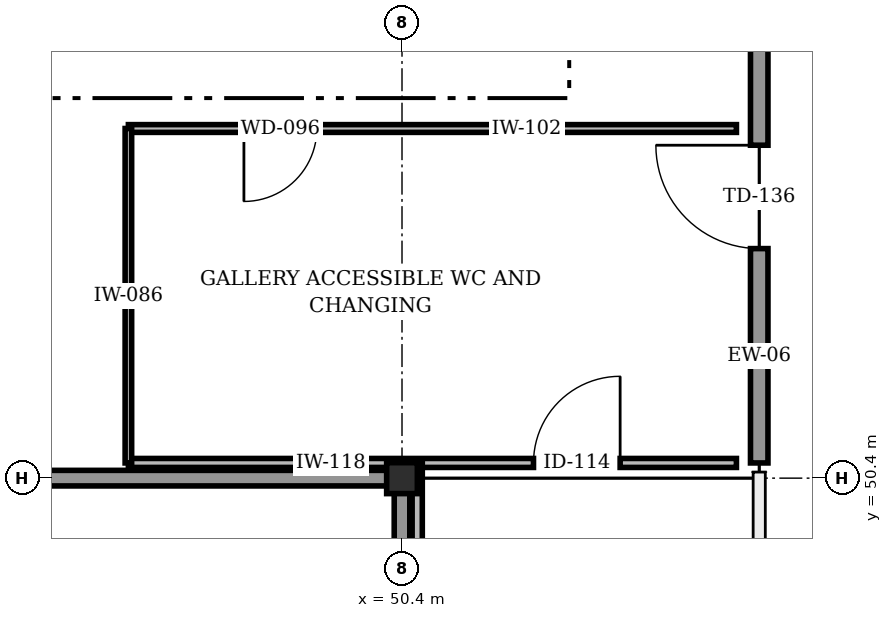
"""IFC4 building model, lengths in metres.
Left out: names, types, materials, properties, quantities, classifications, styles, units other than length and angle.
Written with IfcOpenShell. Run it as: python <this file> out.ifc"""

import sys

from ifc_helpers import new_model, si_unit, direction, frame, frame_2d, origin, origin_2d, place, context, subcontext, project, spatial, rectangle, i_section, extrude, element, fill, save


model = new_model("IFC4")
c1 = context("Model", 3, precision=1e-05, world=origin(), true_north=direction((0.0, 1.0)))
c2 = subcontext(c1, "Body", "Model", "MODEL_VIEW")
j1 = project(units=[si_unit("LENGTHUNIT", "METRE"), si_unit("PLANEANGLEUNIT", "RADIAN")], contexts=[c1])
p1 = place(None, origin())
s1 = spatial("IfcSite", under=j1, at=p1, CompositionType="ELEMENT")
p2 = place(p1, origin())
s2 = spatial("IfcBuilding", under=s1, at=p2, CompositionType="ELEMENT")
p3 = place(p2, frame((0.0, 0.0, 6.0)))
s3 = spatial("IfcBuildingStorey", under=s2, at=p3, CompositionType="ELEMENT", Elevation=6.0)
p4 = place(p3, frame((50.4, 50.4, 0.0), z_axis=(0.0, 0.0, 1.0), x_axis=(1.0, 0.0, 0.0)))
e1 = element("IfcColumn", 1, at=p4, inside=s3, PredefinedType="COLUMN", context=c2, shape_type="SweptSolid", body=[
    extrude(i_section(OverallWidth=0.404, OverallDepth=0.407, WebThickness=0.027, FlangeThickness=0.044, at=origin_2d()), origin(), (0.0, 0.0, 1.0), 4.2),
])
p5 = place(p3, frame((55.1, 50.6, 0.0), z_axis=(0.0, 0.0, 1.0), x_axis=(0.0, 1.0, 0.0)))
e2 = element("IfcWall", 2, at=p5, inside=s3, PredefinedType="STANDARD", context=c2, shape_type="SweptSolid", body=[
    extrude(rectangle(XDim=7.0, YDim=0.23, at=frame_2d((3.5, 0.0))), origin(), (0.0, 0.0, 1.0), 3.247),
])
p6 = place(p5, frame((2.82, 0.0, 0.0)))
e3 = element("IfcOpeningElement", 3, at=p6, cuts=e2, PredefinedType="OPENING", context=c2, shape_type="SweptSolid", body=[
    extrude(rectangle(XDim=1.36, YDim=2.22, at=frame_2d((0.68, 1.11))), frame((0.0, 0.125, 0.0), z_axis=(0.0, -1.0, 0.0), x_axis=(1.0, 0.0, 0.0)), (0.0, 0.0, 1.0), 0.25),
])
p7 = place(p3, frame((31.3, 50.4, 0.0), z_axis=(0.0, 0.0, 1.0), x_axis=(1.0, 0.0, 0.0)))
e4 = element("IfcWall", 4, at=p7, inside=s3, PredefinedType="STANDARD", context=c2, shape_type="SweptSolid", body=[
    extrude(rectangle(XDim=19.1, YDim=0.205, at=frame_2d((9.55, 0.0))), origin(), (0.0, 0.0, 1.0), 3.247),
])
p8 = place(p3, frame((50.4, 50.4, 0.0), z_axis=(0.0, 0.0, 1.0), x_axis=(0.0, -1.0, 0.0)))
e5 = element("IfcWall", 5, at=p8, inside=s3, PredefinedType="STANDARD", context=c2, shape_type="SweptSolid", body=[
    extrude(rectangle(XDim=26.3, YDim=0.205, at=frame_2d((13.15, 0.0))), origin(), (0.0, 0.0, 1.0), 3.247),
])
p9 = place(p3, frame((46.8, 50.6, 0.0), z_axis=(0.0, 0.0, 1.0), x_axis=(1.0, 0.0, 0.0)))
e6 = element("IfcWall", 6, at=p9, inside=s3, PredefinedType="STANDARD", context=c2, shape_type="SweptSolid", body=[
    extrude(rectangle(XDim=8.0, YDim=0.118, at=frame_2d((4.0, 0.0))), origin(), (0.0, 0.0, 1.0), 3.247),
])
p10 = place(p9, frame((5.33, 0.0, 0.0)))
e7 = element("IfcOpeningElement", 7, at=p10, cuts=e6, PredefinedType="OPENING", context=c2, shape_type="SweptSolid", body=[
    extrude(rectangle(XDim=1.14, YDim=2.2, at=frame_2d((0.57, 1.1))), frame((0.0, 0.069, 0.0), z_axis=(0.0, -1.0, 0.0), x_axis=(1.0, 0.0, 0.0)), (0.0, 0.0, 1.0), 0.138),
])
p11 = place(p3, frame((54.8, 55.0, 0.0), z_axis=(0.0, 0.0, 1.0), x_axis=(-1.0, 0.0, 0.0)))
e8 = element("IfcWall", 8, at=p11, inside=s3, PredefinedType="STANDARD", context=c2, shape_type="SweptSolid", body=[
    extrude(rectangle(XDim=8.0, YDim=0.102, at=frame_2d((4.0, 0.0))), origin(), (0.0, 0.0, 1.0), 3.328),
])
p12 = place(p11, frame((5.52, 0.0, 0.0)))
e9 = element("IfcOpeningElement", 9, at=p12, cuts=e8, PredefinedType="OPENING", context=c2, shape_type="SweptSolid", body=[
    extrude(rectangle(XDim=0.96, YDim=2.1, at=frame_2d((0.48, 1.05))), frame((0.0, 0.061, 0.0), z_axis=(0.0, -1.0, 0.0), x_axis=(1.0, 0.0, 0.0)), (0.0, 0.0, 1.0), 0.122),
])
p13 = place(p3, frame((46.8, 55.0, 0.0), z_axis=(0.0, 0.0, 1.0), x_axis=(0.0, -1.0, 0.0)))
e10 = element("IfcWall", 10, at=p13, inside=s3, PredefinedType="STANDARD", context=c2, shape_type="SweptSolid", body=[
    extrude(rectangle(XDim=4.4, YDim=0.086, at=frame_2d((2.2, 0.0))), origin(), (0.0, 0.0, 1.0), 3.247),
])
p14 = place(p3, frame((50.6, 50.6, 0.0), z_axis=(0.0, 0.0, 1.0), x_axis=(0.0, -1.0, 0.0)))
e11 = element("IfcWall", 11, at=p14, inside=s3, PredefinedType="STANDARD", context=c2, shape_type="SweptSolid", body=[
    extrude(rectangle(XDim=26.2, YDim=0.134, at=frame_2d((13.1, 0.0))), origin(), (0.0, 0.0, 1.0), 3.247),
])
p15 = place(p6, origin())
e12 = element("IfcDoor", 12, at=p15, inside=s3, OperationType="SINGLE_SWING_RIGHT", PredefinedType="DOOR", context=c2, shape_type="SweptSolid", body=[
    extrude(rectangle(XDim=1.36, YDim=2.22, at=frame_2d((0.68, 1.11))), frame((0.0, 0.025, 0.0), z_axis=(0.0, -1.0, 0.0), x_axis=(1.0, 0.0, 0.0)), (0.0, 0.0, 1.0), 0.05),
])
fill(e3, e12)
p16 = place(p12, origin())
e13 = element("IfcDoor", 13, at=p16, inside=s3, OperationType="SINGLE_SWING_RIGHT", PredefinedType="DOOR", context=c2, shape_type="SweptSolid", body=[
    extrude(rectangle(XDim=0.96, YDim=2.1, at=frame_2d((0.48, 1.05))), frame((0.0, 0.025, 0.0), z_axis=(0.0, -1.0, 0.0), x_axis=(1.0, 0.0, 0.0)), (0.0, 0.0, 1.0), 0.05),
])
fill(e9, e13)
p17 = place(p10, origin())
e14 = element("IfcDoor", 14, at=p17, inside=s3, OperationType="SINGLE_SWING_RIGHT", PredefinedType="DOOR", context=c2, shape_type="SweptSolid", body=[
    extrude(rectangle(XDim=1.14, YDim=2.2, at=frame_2d((0.57, 1.1))), frame((0.0, 0.025, 0.0), z_axis=(0.0, -1.0, 0.0), x_axis=(1.0, 0.0, 0.0)), (0.0, 0.0, 1.0), 0.05),
])
fill(e7, e14)
save(model, sys.argv[1])
